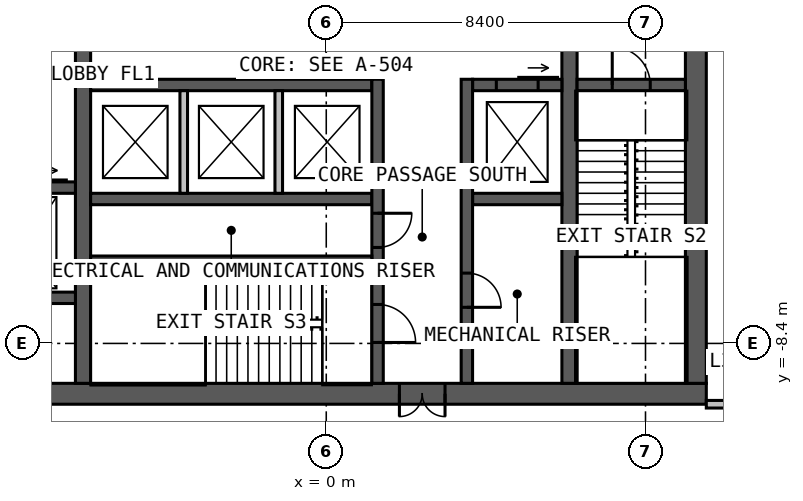
"""IFC4 building model, lengths in metres.
Left out: names, types, materials, properties, quantities, classifications, styles, units other than length and angle.
Written with IfcOpenShell. Run it as: python <this file> out.ifc"""

import sys

from ifc_helpers import new_model, si_unit, direction, frame, frame_2d, origin, place, context, subcontext, project, spatial, rectangle, extrude, element, fill, save


model = new_model("IFC4")
c1 = context("Model", 3, precision=1e-05, world=origin(), true_north=direction((0.0, 1.0)))
c2 = subcontext(c1, "Body", "Model", "MODEL_VIEW")
j1 = project(units=[si_unit("LENGTHUNIT", "METRE"), si_unit("PLANEANGLEUNIT", "RADIAN")], contexts=[c1])
p1 = place(None, origin())
s1 = spatial("IfcSite", under=j1, at=p1, CompositionType="ELEMENT")
p2 = place(p1, origin())
s2 = spatial("IfcBuilding", under=s1, at=p2, CompositionType="ELEMENT")
p3 = place(p2, frame((0.0, 0.0, 142.0)))
s3 = spatial("IfcBuildingStorey", under=s2, at=p3, CompositionType="ELEMENT", Elevation=142.0)
p4 = place(p3, frame((10.0, -9.725, 0.0), z_axis=(0.0, 0.0, 1.0), x_axis=(-1.0, 0.0, 0.0)))
e1 = element("IfcWall", 1, at=p4, inside=s3, PredefinedType="SOLIDWALL", context=c2, shape_type="SweptSolid", body=[
    extrude(rectangle(XDim=20.0, YDim=0.55, at=frame_2d((10.0, 0.0))), origin(), (0.0, 0.0, 1.0), 4.0),
])
p5 = place(p4, frame((6.875, 0.0, 0.0)))
e2 = element("IfcOpeningElement", 2, at=p5, cuts=e1, PredefinedType="OPENING", context=c2, shape_type="SweptSolid", body=[
    extrude(rectangle(XDim=1.2, YDim=2.2, at=frame_2d((0.6, 1.1))), frame((0.0, 0.285, 0.0), z_axis=(0.0, -1.0, 0.0), x_axis=(1.0, 0.0, 0.0)), (0.0, 0.0, 1.0), 0.57),
])
p6 = place(p3, frame((9.725, -9.45, 0.0), z_axis=(0.0, 0.0, 1.0), x_axis=(0.0, 1.0, 0.0)))
e3 = element("IfcWall", 3, at=p6, inside=s3, PredefinedType="SOLIDWALL", context=c2, shape_type="SweptSolid", body=[
    extrude(rectangle(XDim=18.9, YDim=0.55, at=frame_2d((9.45, 0.0))), origin(), (0.0, 0.0, 1.0), 4.0),
])
p7 = place(p3, frame((-6.4, -9.45, 0.0), z_axis=(0.0, 0.0, 1.0), x_axis=(0.0, 1.0, 0.0)))
e4 = element("IfcWall", 4, at=p7, inside=s3, PredefinedType="SOLIDWALL", context=c2, shape_type="SweptSolid", body=[
    extrude(rectangle(XDim=18.9, YDim=0.4, at=frame_2d((9.45, 0.0))), origin(), (0.0, 0.0, 1.0), 4.0),
])
p8 = place(p7, frame((8.95, 0.0, 0.0)))
e5 = element("IfcOpeningElement", 5, at=p8, cuts=e4, PredefinedType="OPENING", context=c2, shape_type="SweptSolid", body=[
    extrude(rectangle(XDim=1.0, YDim=2.2, at=frame_2d((0.5, 1.1))), frame((0.0, 0.21, 0.0), z_axis=(0.0, -1.0, 0.0), x_axis=(1.0, 0.0, 0.0)), (0.0, 0.0, 1.0), 0.42),
])
p9 = place(p3, frame((6.4, 9.45, 0.0), z_axis=(0.0, 0.0, 1.0), x_axis=(0.0, -1.0, 0.0)))
e6 = element("IfcWall", 6, at=p9, inside=s3, PredefinedType="SOLIDWALL", context=c2, shape_type="SweptSolid", body=[
    extrude(rectangle(XDim=18.9, YDim=0.4, at=frame_2d((9.45, 0.0))), origin(), (0.0, 0.0, 1.0), 4.0),
])
p10 = place(p9, frame((8.95, 0.0, 0.0)))
e7 = element("IfcOpeningElement", 7, at=p10, cuts=e6, PredefinedType="OPENING", context=c2, shape_type="SweptSolid", body=[
    extrude(rectangle(XDim=1.0, YDim=2.2, at=frame_2d((0.5, 1.1))), frame((0.0, 0.21, 0.0), z_axis=(0.0, -1.0, 0.0), x_axis=(1.0, 0.0, 0.0)), (0.0, 0.0, 1.0), 0.42),
])
p11 = place(p3, frame((-6.2, -1.6, 0.0), z_axis=(0.0, 0.0, 1.0), x_axis=(1.0, 0.0, 0.0)))
e8 = element("IfcWall", 8, at=p11, inside=s3, PredefinedType="SOLIDWALL", context=c2, shape_type="SweptSolid", body=[
    extrude(rectangle(XDim=7.4, YDim=0.3, at=frame_2d((3.7, 0.0))), origin(), (0.0, 0.0, 1.0), 4.0),
])
p12 = place(p3, frame((3.85, -1.6, 0.0), z_axis=(0.0, 0.0, 1.0), x_axis=(1.0, 0.0, 0.0)))
e9 = element("IfcWall", 9, at=p12, inside=s3, PredefinedType="SOLIDWALL", context=c2, shape_type="SweptSolid", body=[
    extrude(rectangle(XDim=2.35, YDim=0.3, at=frame_2d((1.175, 0.0))), origin(), (0.0, 0.0, 1.0), 4.0),
])
p13 = place(p12, frame((0.625, 0.0, 0.0)))
e10 = element("IfcOpeningElement", 10, at=p13, cuts=e9, PredefinedType="OPENING", context=c2, shape_type="SweptSolid", body=[
    extrude(rectangle(XDim=1.1, YDim=2.2, at=frame_2d((0.55, 1.1))), frame((0.0, 0.16, 0.0), z_axis=(0.0, -1.0, 0.0), x_axis=(1.0, 0.0, 0.0)), (0.0, 0.0, 1.0), 0.32),
])
p14 = place(p3, frame((-6.2, -4.6, 0.0), z_axis=(0.0, 0.0, 1.0), x_axis=(1.0, 0.0, 0.0)))
e11 = element("IfcWall", 11, at=p14, inside=s3, PredefinedType="SOLIDWALL", context=c2, shape_type="SweptSolid", body=[
    extrude(rectangle(XDim=7.4, YDim=0.3, at=frame_2d((3.7, 0.0))), origin(), (0.0, 0.0, 1.0), 4.0),
])
p15 = place(p3, frame((3.85, -4.6, 0.0), z_axis=(0.0, 0.0, 1.0), x_axis=(1.0, 0.0, 0.0)))
e12 = element("IfcWall", 12, at=p15, inside=s3, PredefinedType="SOLIDWALL", context=c2, shape_type="SweptSolid", body=[
    extrude(rectangle(XDim=2.35, YDim=0.3, at=frame_2d((1.175, 0.0))), origin(), (0.0, 0.0, 1.0), 4.0),
])
p16 = place(p3, frame((1.35, -1.45, 0.0), z_axis=(0.0, 0.0, 1.0), x_axis=(0.0, -1.0, 0.0)))
e13 = element("IfcWall", 13, at=p16, inside=s3, PredefinedType="SOLIDWALL", context=c2, shape_type="SweptSolid", body=[
    extrude(rectangle(XDim=8.0, YDim=0.3, at=frame_2d((4.0, 0.0))), origin(), (0.0, 0.0, 1.0), 4.0),
])
p17 = place(p16, frame((5.925, 0.0, 0.0)))
e14 = element("IfcOpeningElement", 14, at=p17, cuts=e13, PredefinedType="OPENING", context=c2, shape_type="SweptSolid", body=[
    extrude(rectangle(XDim=1.0, YDim=2.2, at=frame_2d((0.5, 1.1))), frame((0.0, 0.16, 0.0), z_axis=(0.0, -1.0, 0.0), x_axis=(1.0, 0.0, 0.0)), (0.0, 0.0, 1.0), 0.32),
])
p18 = place(p16, frame((3.525, 0.0, 0.0)))
e15 = element("IfcOpeningElement", 15, at=p18, cuts=e13, PredefinedType="OPENING", context=c2, shape_type="SweptSolid", body=[
    extrude(rectangle(XDim=0.9, YDim=2.2, at=frame_2d((0.45, 1.1))), frame((0.0, 0.16, 0.0), z_axis=(0.0, -1.0, 0.0), x_axis=(1.0, 0.0, 0.0)), (0.0, 0.0, 1.0), 0.32),
])
p19 = place(p3, frame((3.7, -1.45, 0.0), z_axis=(0.0, 0.0, 1.0), x_axis=(0.0, -1.0, 0.0)))
e16 = element("IfcWall", 16, at=p19, inside=s3, PredefinedType="SOLIDWALL", context=c2, shape_type="SweptSolid", body=[
    extrude(rectangle(XDim=8.0, YDim=0.3, at=frame_2d((4.0, 0.0))), origin(), (0.0, 0.0, 1.0), 4.0),
])
p20 = place(p19, frame((5.1, 0.0, 0.0)))
e17 = element("IfcOpeningElement", 17, at=p20, cuts=e16, PredefinedType="OPENING", context=c2, shape_type="SweptSolid", body=[
    extrude(rectangle(XDim=0.9, YDim=2.2, at=frame_2d((0.45, 1.1))), frame((0.0, 0.16, 0.0), z_axis=(0.0, -1.0, 0.0), x_axis=(1.0, 0.0, 0.0)), (0.0, 0.0, 1.0), 0.32),
])
p21 = place(p3, frame((-6.2, -6.2, 0.0), z_axis=(0.0, 0.0, 1.0), x_axis=(1.0, 0.0, 0.0)))
e18 = element("IfcWall", 18, at=p21, inside=s3, PredefinedType="SOLIDWALL", context=c2, shape_type="SweptSolid", body=[
    extrude(rectangle(XDim=7.4, YDim=0.2, at=frame_2d((3.7, 0.0))), origin(), (0.0, 0.0, 1.0), 4.0),
])
p22 = place(p3, frame((6.6, -1.6, 0.0), z_axis=(0.0, 0.0, 1.0), x_axis=(1.0, 0.0, 0.0)))
e19 = element("IfcWall", 19, at=p22, inside=s3, PredefinedType="SOLIDWALL", context=c2, shape_type="SweptSolid", body=[
    extrude(rectangle(XDim=2.85, YDim=0.3, at=frame_2d((1.425, 0.0))), origin(), (0.0, 0.0, 1.0), 4.0),
])
p23 = place(p22, frame((0.925, 0.0, 0.0)))
e20 = element("IfcOpeningElement", 20, at=p23, cuts=e19, PredefinedType="OPENING", context=c2, shape_type="SweptSolid", body=[
    extrude(rectangle(XDim=1.0, YDim=2.2, at=frame_2d((0.5, 1.1))), frame((0.0, 0.16, 0.0), z_axis=(0.0, -1.0, 0.0), x_axis=(1.0, 0.0, 0.0)), (0.0, 0.0, 1.0), 0.32),
])
p24 = place(p3, frame((-9.45, -4.3, 0.0), z_axis=(0.0, 0.0, 1.0), x_axis=(1.0, 0.0, 0.0)))
e21 = element("IfcWall", 21, at=p24, inside=s3, PredefinedType="SOLIDWALL", context=c2, shape_type="SweptSolid", body=[
    extrude(rectangle(XDim=2.85, YDim=0.3, at=frame_2d((1.425, 0.0))), origin(), (0.0, 0.0, 1.0), 4.0),
])
p25 = place(p24, frame((1.0, 0.0, 0.0)))
e22 = element("IfcOpeningElement", 22, at=p25, cuts=e21, PredefinedType="OPENING", context=c2, shape_type="SweptSolid", body=[
    extrude(rectangle(XDim=1.1, YDim=2.2, at=frame_2d((0.55, 1.1))), frame((0.0, 0.16, 0.0), z_axis=(0.0, -1.0, 0.0), x_axis=(1.0, 0.0, 0.0)), (0.0, 0.0, 1.0), 0.32),
])
p26 = place(p3, frame((-9.45, -7.2, 0.0), z_axis=(0.0, 0.0, 1.0), x_axis=(1.0, 0.0, 0.0)))
e23 = element("IfcWall", 23, at=p26, inside=s3, PredefinedType="SOLIDWALL", context=c2, shape_type="SweptSolid", body=[
    extrude(rectangle(XDim=2.85, YDim=0.3, at=frame_2d((1.425, 0.0))), origin(), (0.0, 0.0, 1.0), 4.0),
])
for number, where, z_axis, x_axis in (
    (24, (-3.75, -1.75, 0.0), (0.0, 0.0, 1.0), (0.0, -1.0, 0.0)),
    (25, (-1.25, -1.75, 0.0), (0.0, 0.0, 1.0), (0.0, -1.0, 0.0)),
):
    element("IfcWall", number, at=place(p3, frame(where, z_axis=z_axis, x_axis=x_axis)), inside=s3, PredefinedType="SOLIDWALL", context=c2, shape_type="SweptSolid", body=[
        extrude(rectangle(XDim=2.7, YDim=0.2, at=frame_2d((1.35, 0.0))), origin(), (0.0, 0.0, 1.0), 3.75),
    ])
p27 = place(p3, frame((10.0, -10.0, 0.0), z_axis=(0.0, 0.0, 1.0), x_axis=(1.0, 0.0, 0.0)))
e26 = element("IfcWall", 26, at=p27, inside=s3, PredefinedType="PARTITIONING", context=c2, shape_type="SweptSolid", body=[
    extrude(rectangle(XDim=2.0, YDim=0.2, at=frame_2d((1.0, 0.0))), origin(), (0.0, 0.0, 1.0), 3.8),
])
p28 = place(p27, frame((0.5, 0.0, 0.0)))
e27 = element("IfcOpeningElement", 27, at=p28, cuts=e26, PredefinedType="OPENING", context=c2, shape_type="SweptSolid", body=[
    extrude(rectangle(XDim=1.0, YDim=2.2, at=frame_2d((0.5, 1.1))), frame((0.0, 0.11, 0.0), z_axis=(0.0, -1.0, 0.0), x_axis=(1.0, 0.0, 0.0)), (0.0, 0.0, 1.0), 0.22),
])
p29 = place(p5, origin())
e28 = element("IfcDoor", 28, at=p29, inside=s3, OperationType="DOUBLE_DOOR_SINGLE_SWING", PredefinedType="DOOR", context=c2, shape_type="SweptSolid", body=[
    extrude(rectangle(XDim=1.2, YDim=2.2, at=frame_2d((0.6, 1.1))), frame((0.0, 0.025, 0.0), z_axis=(0.0, -1.0, 0.0), x_axis=(1.0, 0.0, 0.0)), (0.0, 0.0, 1.0), 0.05),
])
fill(e2, e28)
p30 = place(p23, origin())
e29 = element("IfcDoor", 29, at=p30, inside=s3, OperationType="SINGLE_SWING_LEFT", PredefinedType="DOOR", context=c2, shape_type="SweptSolid", body=[
    extrude(rectangle(XDim=1.0, YDim=2.2, at=frame_2d((0.5, 1.1))), frame((0.0, 0.025, 0.0), z_axis=(0.0, -1.0, 0.0), x_axis=(1.0, 0.0, 0.0)), (0.0, 0.0, 1.0), 0.05),
])
fill(e20, e29)
p31 = place(p17, origin())
e30 = element("IfcDoor", 30, at=p31, inside=s3, OperationType="SINGLE_SWING_RIGHT", PredefinedType="DOOR", context=c2, shape_type="SweptSolid", body=[
    extrude(rectangle(XDim=1.0, YDim=2.2, at=frame_2d((0.5, 1.1))), frame((0.0, 0.025, 0.0), z_axis=(0.0, -1.0, 0.0), x_axis=(1.0, 0.0, 0.0)), (0.0, 0.0, 1.0), 0.05),
])
fill(e14, e30)
p32 = place(p18, origin())
e31 = element("IfcDoor", 31, at=p32, inside=s3, OperationType="SINGLE_SWING_LEFT", PredefinedType="DOOR", context=c2, shape_type="SweptSolid", body=[
    extrude(rectangle(XDim=0.9, YDim=2.2, at=frame_2d((0.45, 1.1))), frame((0.0, 0.025, 0.0), z_axis=(0.0, -1.0, 0.0), x_axis=(1.0, 0.0, 0.0)), (0.0, 0.0, 1.0), 0.05),
])
fill(e15, e31)
p33 = place(p20, origin())
e32 = element("IfcDoor", 32, at=p33, inside=s3, OperationType="SINGLE_SWING_RIGHT", PredefinedType="DOOR", context=c2, shape_type="SweptSolid", body=[
    extrude(rectangle(XDim=0.9, YDim=2.2, at=frame_2d((0.45, 1.1))), frame((0.0, 0.025, 0.0), z_axis=(0.0, -1.0, 0.0), x_axis=(1.0, 0.0, 0.0)), (0.0, 0.0, 1.0), 0.05),
])
fill(e17, e32)
p34 = place(p13, origin())
e33 = element("IfcDoor", 33, at=p34, inside=s3, OperationType="SLIDING_TO_LEFT", PredefinedType="DOOR", context=c2, shape_type="SweptSolid", body=[
    extrude(rectangle(XDim=1.1, YDim=2.2, at=frame_2d((0.55, 1.1))), frame((0.0, 0.025, 0.0), z_axis=(0.0, -1.0, 0.0), x_axis=(1.0, 0.0, 0.0)), (0.0, 0.0, 1.0), 0.05),
])
fill(e10, e33)
save(model, sys.argv[1])
